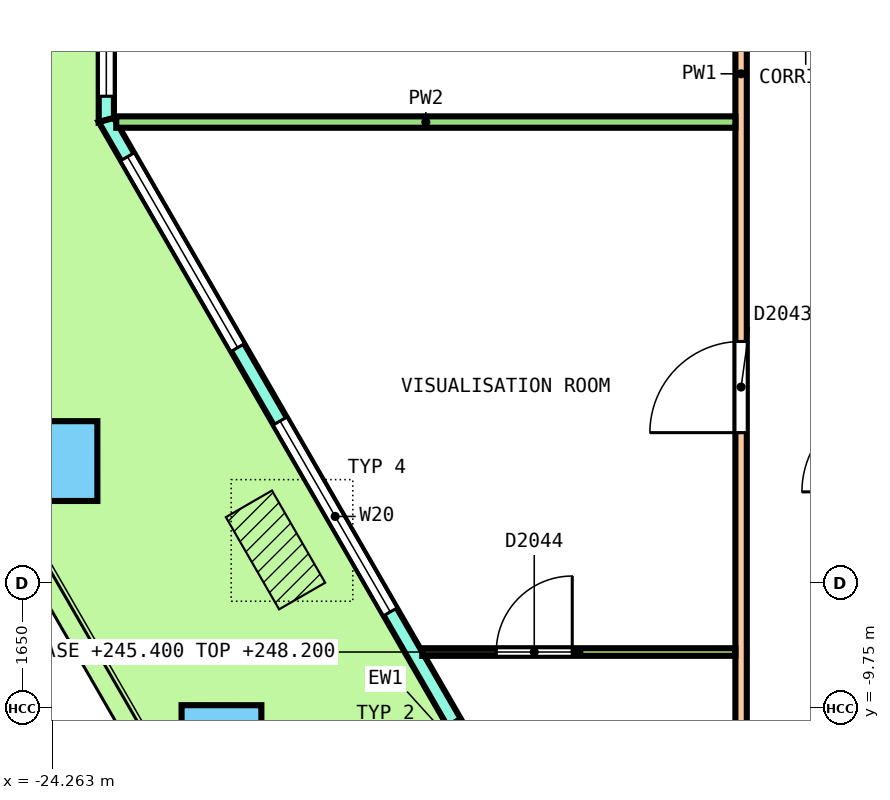
"""IFC4 building model, lengths in metres.
Left out: names, types, materials, properties, quantities, classifications, styles, units other than length and angle.
Written with IfcOpenShell. Run it as: python <this file> out.ifc"""

import sys

from ifc_helpers import new_model, si_unit, direction, frame, frame_2d, origin, origin_2d, place, context, subcontext, project, spatial, polyline, rectangle, outline, extrude, element, fill, save


model = new_model("IFC4")
c1 = context("Model", 3, precision=1e-05, world=origin(), true_north=direction((0.0, 1.0)))
c2 = subcontext(c1, "Body", "Model", "MODEL_VIEW")
j1 = project(units=[si_unit("LENGTHUNIT", "METRE"), si_unit("PLANEANGLEUNIT", "RADIAN")], contexts=[c1])
p1 = place(None, origin())
s1 = spatial("IfcSite", under=j1, at=p1, CompositionType="ELEMENT")
p2 = place(p1, origin())
s2 = spatial("IfcBuilding", under=s1, at=p2, CompositionType="ELEMENT")
p3 = place(p2, frame((0.0, 0.0, 245.4)))
s3 = spatial("IfcBuildingStorey", under=s2, at=p3, CompositionType="ELEMENT", Elevation=245.4)
p4 = place(p3, frame((-24.194, -6.495, 0.0), z_axis=(-0.010899694483, 0.018857140148, 0.999762774325), x_axis=(0.500590334681, -0.865410262129, 0.021780611228)))
e1 = element("IfcColumn", 1, at=p4, inside=s3, PredefinedType="COLUMN", context=c2, shape_type="SweptSolid", body=[
    extrude(rectangle(XDim=1.05, YDim=1.05, at=origin_2d()), origin(), (0.0, 0.0, 1.0), 3.651),
])
p5 = place(p3, frame((-22.037, -10.232, 0.0), z_axis=(-0.003611703602, 0.006287039604, 0.99997371402), x_axis=(0.497890396548, -0.867209652713, 0.007250604559)))
e2 = element("IfcColumn", 2, at=p5, inside=s3, PredefinedType="COLUMN", context=c2, shape_type="SweptSolid", body=[
    extrude(rectangle(XDim=1.05, YDim=1.05, at=origin_2d()), origin(), (0.0, 0.0, 1.0), 3.65),
])
p6 = place(p3, frame((-23.551, 4.145, 0.0), z_axis=(0.0, 0.0, 1.0), x_axis=(0.0, -1.0, 0.0)))
e3 = element("IfcWall", 3, at=p6, inside=s3, PredefinedType="SOLIDWALL", context=c2, shape_type="SweptSolid", body=[
    extrude(outline(polyline([(-0.027, -0.1), (1.008, -0.1), (2.042, -0.1), (3.077, -0.1), (4.111, -0.1), (5.146, -0.1), (6.18, -0.1), (6.126, 0.1), (5.11, 0.1), (4.093, 0.1), (3.077, 0.1), (2.06, 0.1), (1.043, 0.1), (0.027, 0.1), (-0.027, -0.1)])), origin(), (0.0, 0.0, 1.0), 3.7),
])
p7 = place(p6, frame((0.313, 0.0, 0.1)))
e4 = element("IfcOpeningElement", 4, at=p7, cuts=e3, PredefinedType="OPENING", context=c2, shape_type="SweptSolid", body=[
    extrude(rectangle(XDim=2.45, YDim=2.65, at=frame_2d((1.225, 1.325))), frame((0.0, 0.11, 0.0), z_axis=(0.0, -1.0, 0.0), x_axis=(1.0, 0.0, 0.0)), (0.0, 0.0, 1.0), 0.22),
])
p8 = place(p6, frame((3.39, 0.0, 0.1)))
e5 = element("IfcOpeningElement", 5, at=p8, cuts=e3, PredefinedType="OPENING", context=c2, shape_type="SweptSolid", body=[
    extrude(rectangle(XDim=2.45, YDim=2.65, at=frame_2d((1.225, 1.325))), frame((0.0, 0.11, 0.0), z_axis=(0.0, -1.0, 0.0), x_axis=(1.0, 0.0, 0.0)), (0.0, 0.0, 1.0), 0.22),
])
p9 = place(p3, frame((-23.551, -2.008, 0.0), z_axis=(0.0, 0.0, 1.0), x_axis=(0.499997939216, -0.866026593575, 0.0)))
e6 = element("IfcWall", 6, at=p9, inside=s3, PredefinedType="SOLIDWALL", context=c2, shape_type="SweptSolid", body=[
    extrude(outline(polyline([(-0.027, -0.1), (0.979, -0.1), (1.986, -0.1), (2.992, -0.1), (3.999, -0.1), (5.005, -0.1), (6.011, -0.1), (7.018, -0.1), (8.024, -0.1), (9.03, -0.1), (10.037, -0.1), (11.043, -0.1), (12.049, -0.1), (13.056, -0.1), (14.062, -0.1), (15.068, -0.1), (16.075, -0.1), (17.081, -0.1), (18.087, -0.1), (19.094, -0.1), (20.1, -0.1), (20.046, 0.1), (19.045, 0.1), (18.044, 0.1), (17.043, 0.1), (16.042, 0.1), (15.042, 0.1), (14.041, 0.1), (13.04, 0.1), (12.039, 0.1), (11.038, 0.1), (10.037, 0.1), (9.036, 0.1), (8.035, 0.1), (7.034, 0.1), (6.033, 0.1), (5.032, 0.1), (4.031, 0.1), (3.03, 0.1), (2.029, 0.1), (1.028, 0.1), (0.027, 0.1), (-0.027, -0.1)])), origin(), (0.0, 0.0, 1.0), 3.7),
])
p10 = place(p9, frame((0.557, 0.0, 0.1)))
e7 = element("IfcOpeningElement", 7, at=p10, cuts=e6, PredefinedType="OPENING", context=c2, shape_type="SweptSolid", body=[
    extrude(rectangle(XDim=2.9, YDim=2.65, at=frame_2d((1.45, 1.325))), frame((0.0, 0.11, 0.0), z_axis=(0.0, -1.0, 0.0), x_axis=(1.0, 0.0, 0.0)), (0.0, 0.0, 1.0), 0.22),
])
p11 = place(p9, frame((4.572, 0.0, 0.1)))
e8 = element("IfcOpeningElement", 8, at=p11, cuts=e6, PredefinedType="OPENING", context=c2, shape_type="SweptSolid", body=[
    extrude(rectangle(XDim=2.9, YDim=2.65, at=frame_2d((1.45, 1.325))), frame((0.0, 0.11, 0.0), z_axis=(0.0, -1.0, 0.0), x_axis=(1.0, 0.0, 0.0)), (0.0, 0.0, 1.0), 0.22),
])
p12 = place(p9, frame((9.137, 0.0, 0.0)))
e9 = element("IfcOpeningElement", 9, at=p12, cuts=e6, PredefinedType="OPENING", context=c2, shape_type="SweptSolid", body=[
    extrude(rectangle(XDim=1.8, YDim=2.4, at=frame_2d((0.9, 1.2))), frame((0.0, 0.11, 0.0), z_axis=(0.0, -1.0, 0.0), x_axis=(1.0, 0.0, 0.0)), (0.0, 0.0, 1.0), 0.22),
])
p13 = place(p9, frame((9.137, 0.0, 2.55)))
e10 = element("IfcOpeningElement", 10, at=p13, cuts=e6, PredefinedType="OPENING", context=c2, shape_type="SweptSolid", body=[
    extrude(rectangle(XDim=1.8, YDim=0.2, at=frame_2d((0.9, 0.1))), frame((0.0, 0.11, 0.0), z_axis=(0.0, -1.0, 0.0), x_axis=(1.0, 0.0, 0.0)), (0.0, 0.0, 1.0), 0.22),
])
p14 = place(p9, frame((12.601, 0.0, 0.1)))
e11 = element("IfcOpeningElement", 11, at=p14, cuts=e6, PredefinedType="OPENING", context=c2, shape_type="SweptSolid", body=[
    extrude(rectangle(XDim=2.9, YDim=2.65, at=frame_2d((1.45, 1.325))), frame((0.0, 0.11, 0.0), z_axis=(0.0, -1.0, 0.0), x_axis=(1.0, 0.0, 0.0)), (0.0, 0.0, 1.0), 0.22),
])
p15 = place(p9, frame((16.616, 0.0, 0.1)))
e12 = element("IfcOpeningElement", 12, at=p15, cuts=e6, PredefinedType="OPENING", context=c2, shape_type="SweptSolid", body=[
    extrude(rectangle(XDim=2.9, YDim=2.65, at=frame_2d((1.45, 1.325))), frame((0.0, 0.11, 0.0), z_axis=(0.0, -1.0, 0.0), x_axis=(1.0, 0.0, 0.0)), (0.0, 0.0, 1.0), 0.22),
])
p16 = place(p3, frame((-15.2, -10.025, 0.0), z_axis=(0.0, 0.0, 1.0), x_axis=(0.0, 1.0, 0.0)))
e13 = element("IfcWall", 13, at=p16, inside=s3, PredefinedType="PARTITIONING", context=c2, shape_type="SweptSolid", body=[
    extrude(rectangle(XDim=17.25, YDim=0.15, at=frame_2d((8.625, 0.0))), origin(), (0.0, 0.0, 1.0), 2.8),
])
p17 = place(p16, frame((10.89, 0.0, 0.0)))
e14 = element("IfcOpeningElement", 14, at=p17, cuts=e13, PredefinedType="OPENING", context=c2, shape_type="SweptSolid", body=[
    extrude(rectangle(XDim=1.2, YDim=2.1, at=frame_2d((0.6, 1.05))), frame((0.0, 0.085, 0.0), z_axis=(0.0, -1.0, 0.0), x_axis=(1.0, 0.0, 0.0)), (0.0, 0.0, 1.0), 0.17),
])
p18 = place(p16, frame((3.904, 0.0, 0.0)))
e15 = element("IfcOpeningElement", 15, at=p18, cuts=e13, PredefinedType="OPENING", context=c2, shape_type="SweptSolid", body=[
    extrude(rectangle(XDim=1.2, YDim=2.1, at=frame_2d((0.6, 1.05))), frame((0.0, 0.085, 0.0), z_axis=(0.0, -1.0, 0.0), x_axis=(1.0, 0.0, 0.0)), (0.0, 0.0, 1.0), 0.17),
])
p19 = place(p3, frame((-23.42, -2.035, 0.0), z_axis=(0.0, 0.0, 1.0), x_axis=(1.0, 0.0, 0.0)))
e16 = element("IfcWall", 16, at=p19, inside=s3, PredefinedType="PARTITIONING", context=c2, shape_type="SweptSolid", body=[
    extrude(rectangle(XDim=8.146, YDim=0.15, at=frame_2d((4.073, 0.0))), origin(), (0.0, 0.0, 1.0), 2.8),
])
p20 = place(p3, frame((-19.395, -9.007, 0.0), z_axis=(0.0, 0.0, 1.0), x_axis=(1.0, 0.0, 0.0)))
e17 = element("IfcWall", 17, at=p20, inside=s3, PredefinedType="PARTITIONING", context=c2, shape_type="SweptSolid", body=[
    extrude(rectangle(XDim=4.12, YDim=0.1, at=frame_2d((2.06, 0.0))), origin(), (0.0, 0.0, 1.0), 2.8),
])
p21 = place(p20, frame((0.974, 0.0, 0.0)))
e18 = element("IfcOpeningElement", 18, at=p21, cuts=e17, PredefinedType="OPENING", context=c2, shape_type="SweptSolid", body=[
    extrude(rectangle(XDim=1.0, YDim=2.1, at=frame_2d((0.5, 1.05))), frame((0.0, 0.06, 0.0), z_axis=(0.0, -1.0, 0.0), x_axis=(1.0, 0.0, 0.0)), (0.0, 0.0, 1.0), 0.12),
])
p22 = place(p8, origin())
e19 = element("IfcWindow", 19, at=p22, inside=s3, PartitioningType="SINGLE_PANEL", PredefinedType="WINDOW", context=c2, shape_type="SweptSolid", body=[
    extrude(rectangle(XDim=2.45, YDim=2.65, at=frame_2d((1.225, 1.325))), frame((0.0, 0.03, 0.0), z_axis=(0.0, -1.0, 0.0), x_axis=(1.0, 0.0, 0.0)), (0.0, 0.0, 1.0), 0.06),
])
fill(e5, e19)
p23 = place(p10, origin())
e20 = element("IfcWindow", 20, at=p23, inside=s3, PartitioningType="SINGLE_PANEL", PredefinedType="WINDOW", context=c2, shape_type="SweptSolid", body=[
    extrude(rectangle(XDim=2.9, YDim=2.65, at=frame_2d((1.45, 1.325))), frame((0.0, 0.03, 0.0), z_axis=(0.0, -1.0, 0.0), x_axis=(1.0, 0.0, 0.0)), (0.0, 0.0, 1.0), 0.06),
])
fill(e7, e20)
p24 = place(p11, origin())
e21 = element("IfcWindow", 21, at=p24, inside=s3, PartitioningType="SINGLE_PANEL", PredefinedType="WINDOW", context=c2, shape_type="SweptSolid", body=[
    extrude(rectangle(XDim=2.9, YDim=2.65, at=frame_2d((1.45, 1.325))), frame((0.0, 0.03, 0.0), z_axis=(0.0, -1.0, 0.0), x_axis=(1.0, 0.0, 0.0)), (0.0, 0.0, 1.0), 0.06),
])
fill(e8, e21)
p25 = place(p12, origin())
e22 = element("IfcDoor", 22, at=p25, inside=s3, OperationType="DOUBLE_DOOR_SINGLE_SWING", PredefinedType="DOOR", context=c2, shape_type="SweptSolid", body=[
    extrude(rectangle(XDim=1.8, YDim=2.4, at=frame_2d((0.9, 1.2))), frame((0.0, 0.025, 0.0), z_axis=(0.0, -1.0, 0.0), x_axis=(1.0, 0.0, 0.0)), (0.0, 0.0, 1.0), 0.05),
])
fill(e9, e22)
p26 = place(p13, origin())
e23 = element("IfcWindow", 23, at=p26, inside=s3, PartitioningType="SINGLE_PANEL", PredefinedType="WINDOW", context=c2, shape_type="SweptSolid", body=[
    extrude(rectangle(XDim=1.8, YDim=0.2, at=frame_2d((0.9, 0.1))), frame((0.0, 0.03, 0.0), z_axis=(0.0, -1.0, 0.0), x_axis=(1.0, 0.0, 0.0)), (0.0, 0.0, 1.0), 0.06),
])
fill(e10, e23)
p27 = place(p18, origin())
e24 = element("IfcDoor", 24, at=p27, inside=s3, OperationType="DOUBLE_DOOR_SINGLE_SWING", PredefinedType="DOOR", context=c2, shape_type="SweptSolid", body=[
    extrude(rectangle(XDim=1.2, YDim=2.1, at=frame_2d((0.6, 1.05))), frame((0.0, 0.025, 0.0), z_axis=(0.0, -1.0, 0.0), x_axis=(1.0, 0.0, 0.0)), (0.0, 0.0, 1.0), 0.05),
])
fill(e15, e24)
p28 = place(p21, origin())
e25 = element("IfcDoor", 25, at=p28, inside=s3, OperationType="SINGLE_SWING_LEFT", PredefinedType="DOOR", context=c2, shape_type="SweptSolid", body=[
    extrude(rectangle(XDim=1.0, YDim=2.1, at=frame_2d((0.5, 1.05))), frame((0.0, 0.025, 0.0), z_axis=(0.0, -1.0, 0.0), x_axis=(1.0, 0.0, 0.0)), (0.0, 0.0, 1.0), 0.05),
])
fill(e18, e25)
save(model, sys.argv[1])
